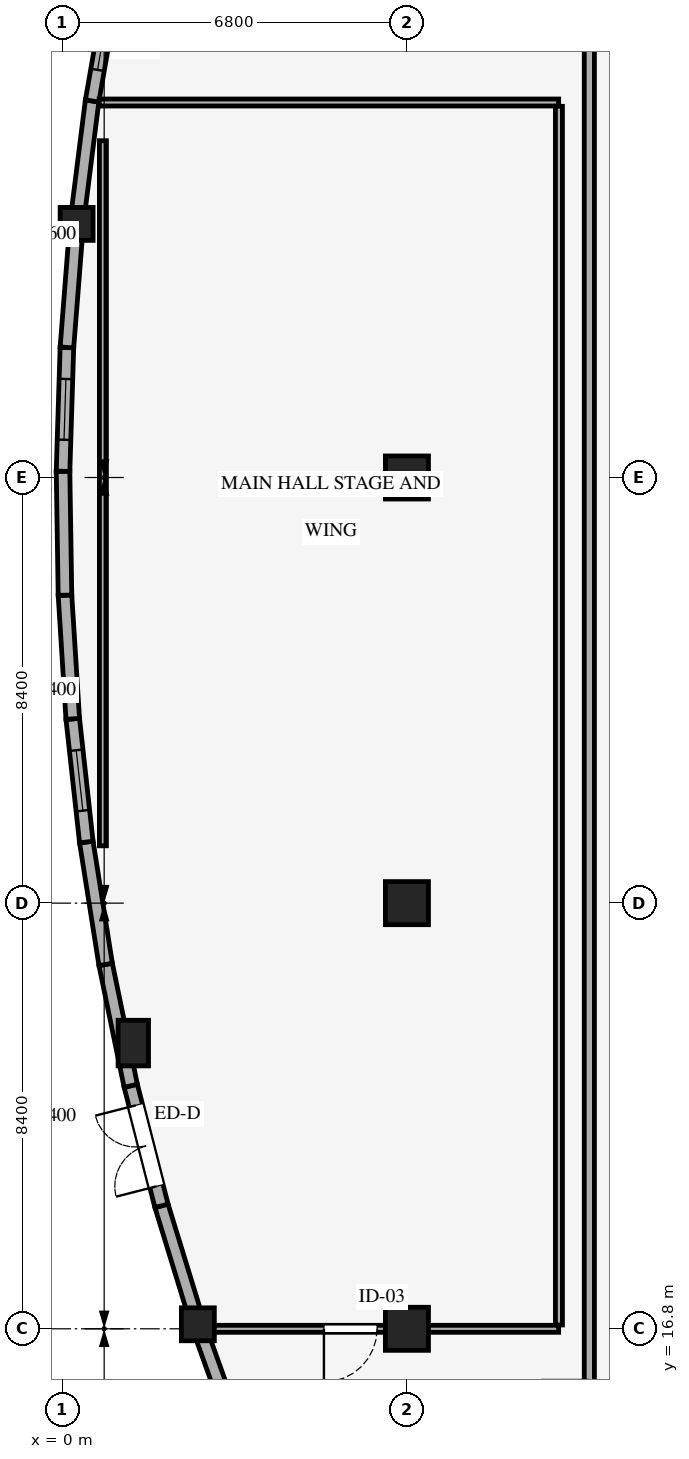
"""IFC4 building model, lengths in metres.
Left out: names, types, materials, properties, quantities, classifications, styles, units other than length and angle.
Written with IfcOpenShell. Run it as: python <this file> out.ifc"""

import sys

from ifc_helpers import new_model, si_unit, direction, frame, frame_2d, origin, origin_2d, place, context, subcontext, project, spatial, rectangle, circle, extrude, element, fill, save


model = new_model("IFC4")
c1 = context("Model", 3, precision=1e-05, world=origin(), true_north=direction((0.0, 1.0)))
c2 = subcontext(c1, "Body", "Model", "MODEL_VIEW")
j1 = project(units=[si_unit("LENGTHUNIT", "METRE"), si_unit("PLANEANGLEUNIT", "RADIAN")], contexts=[c1])
p1 = place(None, origin())
s1 = spatial("IfcSite", under=j1, at=p1, CompositionType="ELEMENT")
p2 = place(p1, origin())
s2 = spatial("IfcBuilding", under=s1, at=p2, CompositionType="ELEMENT")
p3 = place(p2, origin())
s3 = spatial("IfcBuildingStorey", under=s2, at=p3, CompositionType="ELEMENT", Elevation=0.0)
for number, where, z_axis, x_axis in (
    (1, (0.052, 31.277, 0.0), (0.0, 0.0, 1.0), (1.0, 0.0, 0.0)),
    (2, (0.281, 38.604, 0.0), (0.0, 0.0, 1.0), (1.0, 0.0, 0.0)),
):
    element("IfcColumn", number, at=place(p3, frame(where, z_axis=z_axis, x_axis=x_axis)), inside=s3, PredefinedType="COLUMN", context=c2, shape_type="SweptSolid", body=[
        extrude(circle(Radius=0.325, at=origin_2d()), origin(), (0.0, 0.0, 1.0), 4.8),
    ])
p4 = place(p3, frame((1.4, 22.438, 0.0), z_axis=(0.0, 0.0, 1.0), x_axis=(1.0, 0.0, 0.0)))
e3 = element("IfcColumn", 3, at=p4, inside=s3, PredefinedType="COLUMN", context=c2, shape_type="SweptSolid", body=[
    extrude(rectangle(XDim=0.6, YDim=0.9, at=origin_2d()), origin(), (0.0, 0.0, 1.0), 4.8),
])
p5 = place(p3, frame((2.674, 16.889, 0.0), z_axis=(0.0, 0.0, 1.0), x_axis=(1.0, 0.0, 0.0)))
e4 = element("IfcColumn", 4, at=p5, inside=s3, PredefinedType="COLUMN", context=c2, shape_type="SweptSolid", body=[
    extrude(circle(Radius=0.325, at=origin_2d()), origin(), (0.0, 0.0, 1.0), 4.8),
])
for number, where, z_axis, x_axis in (
    (5, (6.8, 16.8, 0.0), (0.0, 0.0, 1.0), (1.0, 0.0, 0.0)),
    (6, (6.8, 25.2, 0.0), (0.0, 0.0, 1.0), (1.0, 0.0, 0.0)),
    (7, (6.8, 33.6, 0.0), (0.0, 0.0, 1.0), (1.0, 0.0, 0.0)),
):
    element("IfcColumn", number, at=place(p3, frame(where, z_axis=z_axis, x_axis=x_axis)), inside=s3, PredefinedType="COLUMN", context=c2, shape_type="SweptSolid", body=[
        extrude(rectangle(XDim=0.85, YDim=0.85, at=origin_2d()), origin(), (0.0, 0.0, 1.0), 4.8),
    ])
p6 = place(p3, frame((3.501, 14.587, 0.0), z_axis=(0.0, 0.0, 1.0), x_axis=(-0.338125508997, 0.941101025483, 0.0)))
e8 = element("IfcWall", 8, at=p6, inside=s3, PredefinedType="STANDARD", context=c2, shape_type="SweptSolid", body=[
    extrude(rectangle(XDim=2.446, YDim=0.268, at=frame_2d((1.223, 0.0))), origin(), (0.0, 0.0, 1.0), 3.82),
])
p7 = place(p3, frame((2.674, 16.889, 0.0), z_axis=(0.0, 0.0, 1.0), x_axis=(-0.293524545096, 0.955951537174, 0.0)))
e9 = element("IfcWall", 9, at=p7, inside=s3, PredefinedType="STANDARD", context=c2, shape_type="SweptSolid", body=[
    extrude(rectangle(XDim=2.445, YDim=0.268, at=frame_2d((1.223, 0.0))), origin(), (0.0, 0.0, 1.0), 3.82),
])
p8 = place(p3, frame((1.957, 19.227, 0.0), z_axis=(0.0, 0.0, 1.0), x_axis=(-0.248192795271, 0.968710656685, 0.0)))
e10 = element("IfcWall", 10, at=p8, inside=s3, PredefinedType="STANDARD", context=c2, shape_type="SweptSolid", body=[
    extrude(rectangle(XDim=2.445, YDim=0.268, at=frame_2d((1.223, 0.0))), origin(), (0.0, 0.0, 1.0), 3.82),
])
p9 = place(p8, frame((0.398, 0.0, 0.0)))
e11 = element("IfcOpeningElement", 11, at=p9, cuts=e10, PredefinedType="OPENING", context=c2, shape_type="SweptSolid", body=[
    extrude(rectangle(XDim=1.65, YDim=2.2, at=frame_2d((0.825, 1.1))), frame((0.0, 0.144, 0.0), z_axis=(0.0, -1.0, 0.0), x_axis=(1.0, 0.0, 0.0)), (0.0, 0.0, 1.0), 0.288),
])
p10 = place(p3, frame((1.35, 21.595, 0.0), z_axis=(0.0, 0.0, 1.0), x_axis=(-0.202466947534, 0.979289096823, 0.0)))
e12 = element("IfcWall", 12, at=p10, inside=s3, PredefinedType="STANDARD", context=c2, shape_type="SweptSolid", body=[
    extrude(rectangle(XDim=2.445, YDim=0.268, at=frame_2d((1.223, 0.0))), origin(), (0.0, 0.0, 1.0), 3.82),
])
p11 = place(p3, frame((0.854, 23.99, 0.0), z_axis=(0.0, 0.0, 1.0), x_axis=(-0.156136871901, 0.987735428763, 0.0)))
e13 = element("IfcWall", 13, at=p11, inside=s3, PredefinedType="STANDARD", context=c2, shape_type="SweptSolid", body=[
    extrude(rectangle(XDim=2.446, YDim=0.268, at=frame_2d((1.223, 0.0))), origin(), (0.0, 0.0, 1.0), 3.82),
])
p12 = place(p3, frame((0.473, 26.406, 0.0), z_axis=(0.0, 0.0, 1.0), x_axis=(-0.109521982528, 0.993984373792, 0.0)))
e14 = element("IfcWall", 14, at=p12, inside=s3, PredefinedType="STANDARD", context=c2, shape_type="SweptSolid", body=[
    extrude(rectangle(XDim=2.445, YDim=0.268, at=frame_2d((1.223, 0.0))), origin(), (0.0, 0.0, 1.0), 3.82),
])
p13 = place(p12, frame((0.623, 0.0, 0.9)))
e15 = element("IfcOpeningElement", 15, at=p13, cuts=e14, PredefinedType="OPENING", context=c2, shape_type="SweptSolid", body=[
    extrude(rectangle(XDim=1.2, YDim=1.8, at=frame_2d((0.6, 0.9))), frame((0.0, 0.144, 0.0), z_axis=(0.0, -1.0, 0.0), x_axis=(1.0, 0.0, 0.0)), (0.0, 0.0, 1.0), 0.288),
])
p14 = place(p3, frame((0.205, 28.836, 0.0), z_axis=(0.0, 0.0, 1.0), x_axis=(-0.062695263199, 0.998032716885, 0.0)))
e16 = element("IfcWall", 16, at=p14, inside=s3, PredefinedType="STANDARD", context=c2, shape_type="SweptSolid", body=[
    extrude(rectangle(XDim=2.446, YDim=0.268, at=frame_2d((1.223, 0.0))), origin(), (0.0, 0.0, 1.0), 3.82),
])
p15 = place(p3, frame((0.052, 31.277, 0.0), z_axis=(0.0, 0.0, 1.0), x_axis=(-0.015674559362, 0.999877146548, 0.0)))
e17 = element("IfcWall", 17, at=p15, inside=s3, PredefinedType="STANDARD", context=c2, shape_type="SweptSolid", body=[
    extrude(rectangle(XDim=2.445, YDim=0.268, at=frame_2d((1.223, 0.0))), origin(), (0.0, 0.0, 1.0), 3.82),
])
p16 = place(p3, frame((0.013, 33.722, 0.0), z_axis=(0.0, 0.0, 1.0), x_axis=(0.031346952552, 0.999508563528, 0.0)))
e18 = element("IfcWall", 18, at=p16, inside=s3, PredefinedType="STANDARD", context=c2, shape_type="SweptSolid", body=[
    extrude(rectangle(XDim=2.446, YDim=0.268, at=frame_2d((1.223, 0.0))), origin(), (0.0, 0.0, 1.0), 3.82),
])
p17 = place(p16, frame((0.623, 0.0, 0.9)))
e19 = element("IfcOpeningElement", 19, at=p17, cuts=e18, PredefinedType="OPENING", context=c2, shape_type="SweptSolid", body=[
    extrude(rectangle(XDim=1.2, YDim=1.8, at=frame_2d((0.6, 0.9))), frame((0.0, 0.144, 0.0), z_axis=(0.0, -1.0, 0.0), x_axis=(1.0, 0.0, 0.0)), (0.0, 0.0, 1.0), 0.288),
])
p18 = place(p3, frame((0.09, 36.167, 0.0), z_axis=(0.0, 0.0, 1.0), x_axis=(0.078276857386, 0.996931659442, 0.0)))
e20 = element("IfcWall", 20, at=p18, inside=s3, PredefinedType="STANDARD", context=c2, shape_type="SweptSolid", body=[
    extrude(rectangle(XDim=2.445, YDim=0.268, at=frame_2d((1.223, 0.0))), origin(), (0.0, 0.0, 1.0), 3.82),
])
p19 = place(p3, frame((0.281, 38.604, 0.0), z_axis=(0.0, 0.0, 1.0), x_axis=(0.125091363355, 0.992145226675, 0.0)))
e21 = element("IfcWall", 21, at=p19, inside=s3, PredefinedType="STANDARD", context=c2, shape_type="SweptSolid", body=[
    extrude(rectangle(XDim=2.446, YDim=0.268, at=frame_2d((1.223, 0.0))), origin(), (0.0, 0.0, 1.0), 3.82),
])
p20 = place(p3, frame((0.587, 41.031, 0.0), z_axis=(0.0, 0.0, 1.0), x_axis=(0.171518128885, 0.985180963815, 0.0)))
e22 = element("IfcWall", 22, at=p20, inside=s3, PredefinedType="STANDARD", context=c2, shape_type="SweptSolid", body=[
    extrude(rectangle(XDim=2.445, YDim=0.268, at=frame_2d((1.223, 0.0))), origin(), (0.0, 0.0, 1.0), 3.82),
])
p21 = place(p20, frame((0.623, 0.0, 0.9)))
e23 = element("IfcOpeningElement", 23, at=p21, cuts=e22, PredefinedType="OPENING", context=c2, shape_type="SweptSolid", body=[
    extrude(rectangle(XDim=1.2, YDim=1.8, at=frame_2d((0.6, 0.9))), frame((0.0, 0.144, 0.0), z_axis=(0.0, -1.0, 0.0), x_axis=(1.0, 0.0, 0.0)), (0.0, 0.0, 1.0), 0.288),
])
p22 = place(p3, frame((10.4, 10.475, 0.0), z_axis=(0.0, 0.0, 1.0), x_axis=(0.0, 1.0, 0.0)))
e24 = element("IfcWall", 24, at=p22, inside=s3, PredefinedType="STANDARD", context=c2, shape_type="SweptSolid", body=[
    extrude(rectangle(XDim=36.05, YDim=0.2, at=frame_2d((18.025, 0.0))), origin(), (0.0, 0.0, 1.0), 4.49),
])
p23 = place(p22, frame((3.415, 0.0, 0.0)))
e25 = element("IfcOpeningElement", 25, at=p23, cuts=e24, PredefinedType="OPENING", context=c2, shape_type="SweptSolid", body=[
    extrude(rectangle(XDim=1.9, YDim=2.35, at=frame_2d((0.95, 1.175))), frame((0.0, 0.11, 0.0), z_axis=(0.0, -1.0, 0.0), x_axis=(1.0, 0.0, 0.0)), (0.0, 0.0, 1.0), 0.22),
])
p24 = place(p3, frame((0.8, 26.332, 0.0), z_axis=(0.0, 0.0, 1.0), x_axis=(0.0, 1.0, 0.0)))
e26 = element("IfcWall", 26, at=p24, inside=s3, PredefinedType="STANDARD", context=c2, shape_type="SweptSolid", body=[
    extrude(rectangle(XDim=13.914, YDim=0.138, at=frame_2d((6.957, 0.0))), origin(), (0.0, 0.0, 1.0), 3.82),
])
p25 = place(p3, frame((0.725, 41.0, 0.0), z_axis=(0.0, 0.0, 1.0), x_axis=(1.0, 0.0, 0.0)))
e27 = element("IfcWall", 27, at=p25, inside=s3, PredefinedType="STANDARD", context=c2, shape_type="SweptSolid", body=[
    extrude(rectangle(XDim=9.07, YDim=0.138, at=frame_2d((4.535, 0.0))), origin(), (0.0, 0.0, 1.0), 3.62),
])
p26 = place(p3, frame((9.8, 40.925, 0.0), z_axis=(0.0, 0.0, 1.0), x_axis=(0.0, -1.0, 0.0)))
e28 = element("IfcWall", 28, at=p26, inside=s3, PredefinedType="STANDARD", context=c2, shape_type="SweptSolid", body=[
    extrude(rectangle(XDim=24.05, YDim=0.138, at=frame_2d((12.025, 0.0))), origin(), (0.0, 0.0, 1.0), 4.49),
])
p27 = place(p3, frame((9.795, 16.8, 0.0), z_axis=(0.0, 0.0, 1.0), x_axis=(-1.0, 0.0, 0.0)))
e29 = element("IfcWall", 29, at=p27, inside=s3, PredefinedType="STANDARD", context=c2, shape_type="SweptSolid", body=[
    extrude(rectangle(XDim=6.829, YDim=0.138, at=frame_2d((3.414, 0.0))), origin(), (0.0, 0.0, 1.0), 3.62),
])
p28 = place(p27, frame((3.583, 0.0, 0.0)))
e30 = element("IfcOpeningElement", 30, at=p28, cuts=e29, PredefinedType="OPENING", context=c2, shape_type="SweptSolid", body=[
    extrude(rectangle(XDim=1.05, YDim=2.15, at=frame_2d((0.525, 1.075))), frame((0.0, 0.079, 0.0), z_axis=(0.0, -1.0, 0.0), x_axis=(1.0, 0.0, 0.0)), (0.0, 0.0, 1.0), 0.158),
])
p29 = place(p13, origin())
e31 = element("IfcWindow", 31, at=p29, inside=s3, PartitioningType="SINGLE_PANEL", PredefinedType="WINDOW", context=c2, shape_type="SweptSolid", body=[
    extrude(rectangle(XDim=1.2, YDim=1.8, at=frame_2d((0.6, 0.9))), frame((0.0, 0.03, 0.0), z_axis=(0.0, -1.0, 0.0), x_axis=(1.0, 0.0, 0.0)), (0.0, 0.0, 1.0), 0.06),
])
fill(e15, e31)
p30 = place(p17, origin())
e32 = element("IfcWindow", 32, at=p30, inside=s3, PartitioningType="SINGLE_PANEL", PredefinedType="WINDOW", context=c2, shape_type="SweptSolid", body=[
    extrude(rectangle(XDim=1.2, YDim=1.8, at=frame_2d((0.6, 0.9))), frame((0.0, 0.03, 0.0), z_axis=(0.0, -1.0, 0.0), x_axis=(1.0, 0.0, 0.0)), (0.0, 0.0, 1.0), 0.06),
])
fill(e19, e32)
p31 = place(p21, origin())
e33 = element("IfcWindow", 33, at=p31, inside=s3, PartitioningType="SINGLE_PANEL", PredefinedType="WINDOW", context=c2, shape_type="SweptSolid", body=[
    extrude(rectangle(XDim=1.2, YDim=1.8, at=frame_2d((0.6, 0.9))), frame((0.0, 0.03, 0.0), z_axis=(0.0, -1.0, 0.0), x_axis=(1.0, 0.0, 0.0)), (0.0, 0.0, 1.0), 0.06),
])
fill(e23, e33)
p32 = place(p9, origin())
e34 = element("IfcDoor", 34, at=p32, inside=s3, OperationType="DOUBLE_DOOR_SINGLE_SWING", PredefinedType="DOOR", context=c2, shape_type="SweptSolid", body=[
    extrude(rectangle(XDim=1.65, YDim=2.2, at=frame_2d((0.825, 1.1))), frame((0.0, 0.025, 0.0), z_axis=(0.0, -1.0, 0.0), x_axis=(1.0, 0.0, 0.0)), (0.0, 0.0, 1.0), 0.05),
])
fill(e11, e34)
p33 = place(p28, origin())
e35 = element("IfcDoor", 35, at=p33, inside=s3, OperationType="SINGLE_SWING_RIGHT", PredefinedType="DOOR", context=c2, shape_type="SweptSolid", body=[
    extrude(rectangle(XDim=1.05, YDim=2.15, at=frame_2d((0.525, 1.075))), frame((0.0, 0.025, 0.0), z_axis=(0.0, -1.0, 0.0), x_axis=(1.0, 0.0, 0.0)), (0.0, 0.0, 1.0), 0.05),
])
fill(e30, e35)
save(model, sys.argv[1])
